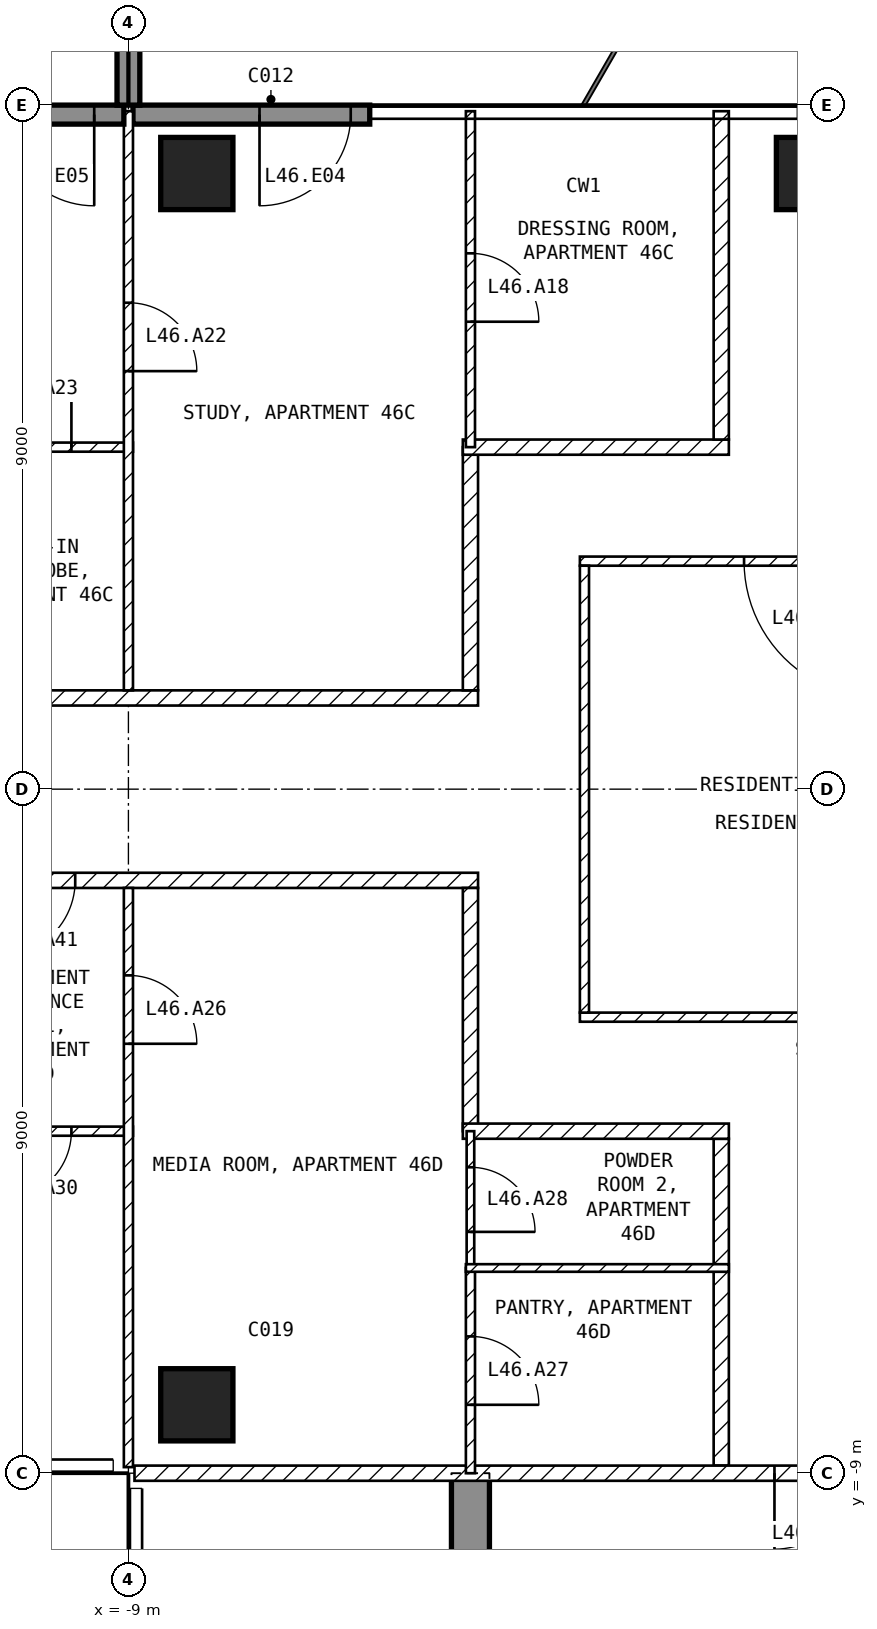
"""IFC4 building model, lengths in metres.
Left out: names, types, materials, properties, quantities, classifications, styles, units other than length and angle.
Written with IfcOpenShell. Run it as: python <this file> out.ifc"""

import sys

from ifc_helpers import new_model, si_unit, direction, frame, frame_2d, origin, origin_2d, place, context, subcontext, project, spatial, polyline, rectangle, outline, extrude, element, fill, save


model = new_model("IFC4")
c1 = context("Model", 3, precision=1e-05, world=origin(), true_north=direction((0.0, 1.0)))
c2 = subcontext(c1, "Body", "Model", "MODEL_VIEW")
j1 = project(units=[si_unit("LENGTHUNIT", "METRE"), si_unit("PLANEANGLEUNIT", "RADIAN")], contexts=[c1])
p1 = place(None, origin())
s1 = spatial("IfcSite", under=j1, at=p1, CompositionType="ELEMENT")
p2 = place(p1, origin())
s2 = spatial("IfcBuilding", under=s1, at=p2, CompositionType="ELEMENT")
p3 = place(p2, frame((0.0, 0.0, 187.6)))
s3 = spatial("IfcBuildingStorey", under=s2, at=p3, CompositionType="ELEMENT", Elevation=187.6)
for number, where, z_axis, x_axis in (
    (1, (-8.1, -8.1, -0.25), (0.0, 0.0, 1.0), (1.0, 0.0, 0.0)),
    (2, (-8.1, 8.1, -0.25), (0.0, 0.0, 1.0), (1.0, 0.0, 0.0)),
    (3, (0.0, 8.1, -0.25), (0.0, 0.0, 1.0), (1.0, 0.0, 0.0)),
):
    element("IfcColumn", number, at=place(p3, frame(where, z_axis=z_axis, x_axis=x_axis)), inside=s3, PredefinedType="COLUMN", context=c2, shape_type="SweptSolid", body=[
        extrude(rectangle(XDim=0.95, YDim=0.95, at=origin_2d()), origin(), (0.0, 0.0, 1.0), 3.5),
    ])
p4 = place(p3, frame((-4.75, -20.225, -0.25), z_axis=(1.0, 0.0, 0.0), x_axis=(0.0, 1.0, 0.0)))
e4 = element("IfcWall", 4, at=p4, inside=s3, PredefinedType="SHEAR", context=c2, shape_type="SweptSolid", body=[
    extrude(outline(polyline([(0.0, 0.0), (6.725, 0.0), (6.725, 2.65), (9.125, 2.65), (9.125, 0.0), (11.225, 0.0), (11.225, 3.5), (0.0, 3.5), (0.0, 0.0)])), origin(), (0.0, 0.0, 1.0), 0.5),
])
p5 = place(p3, frame((-5.825, 8.875, 0.0), z_axis=(0.0, 0.0, 1.0), x_axis=(-1.0, 0.0, 0.0)))
e5 = element("IfcWall", 5, at=p5, inside=s3, PredefinedType="SOLIDWALL", context=c2, shape_type="SweptSolid", body=[
    extrude(rectangle(XDim=3.115, YDim=0.25, at=frame_2d((1.558, 0.0))), origin(), (0.0, 0.0, 1.0), 3.25),
])
p6 = place(p5, frame((0.25, 0.0, 0.0)))
e6 = element("IfcOpeningElement", 6, at=p6, cuts=e5, PredefinedType="OPENING", context=c2, shape_type="SweptSolid", body=[
    extrude(rectangle(XDim=1.2, YDim=2.4, at=frame_2d((0.6, 1.2))), frame((0.0, 0.135, 0.0), z_axis=(0.0, -1.0, 0.0), x_axis=(1.0, 0.0, 0.0)), (0.0, 0.0, 1.0), 0.27),
])
p7 = place(p3, frame((-9.06, 8.875, 0.0), z_axis=(0.0, 0.0, 1.0), x_axis=(-1.0, 0.0, 0.0)))
e7 = element("IfcWall", 7, at=p7, inside=s3, PredefinedType="SOLIDWALL", context=c2, shape_type="SweptSolid", body=[
    extrude(rectangle(XDim=1.84, YDim=0.25, at=frame_2d((0.92, 0.0))), origin(), (0.0, 0.0, 1.0), 3.25),
])
p8 = place(p7, frame((0.39, 0.0, 0.0)))
e8 = element("IfcOpeningElement", 8, at=p8, cuts=e7, PredefinedType="OPENING", context=c2, shape_type="SweptSolid", body=[
    extrude(rectangle(XDim=1.2, YDim=2.4, at=frame_2d((0.6, 1.2))), frame((0.0, 0.135, 0.0), z_axis=(0.0, -1.0, 0.0), x_axis=(1.0, 0.0, 0.0)), (0.0, 0.0, 1.0), 0.27),
])
p9 = place(p3, frame((-9.0, 9.0, 0.0), z_axis=(0.0, 0.0, 1.0), x_axis=(0.0, 1.0, 0.0)))
e9 = element("IfcWall", 9, at=p9, inside=s3, PredefinedType="SOLIDWALL", context=c2, shape_type="SweptSolid", body=[
    extrude(rectangle(XDim=2.7, YDim=0.3, at=frame_2d((1.35, 0.0))), origin(), (0.0, 0.0, 1.0), 3.25),
])
p10 = place(p3, frame((-3.06, -3.0, 0.0), z_axis=(0.0, 0.0, 1.0), x_axis=(1.0, 0.0, 0.0)))
e10 = element("IfcWall", 10, at=p10, inside=s3, PredefinedType="PARTITIONING", context=c2, shape_type="SweptSolid", body=[
    extrude(rectangle(XDim=6.12, YDim=0.12, at=frame_2d((3.06, 0.0))), origin(), (0.0, 0.0, 1.0), 3.25),
])
p11 = place(p3, frame((3.06, 3.0, 0.0), z_axis=(0.0, 0.0, 1.0), x_axis=(-1.0, 0.0, 0.0)))
e11 = element("IfcWall", 11, at=p11, inside=s3, PredefinedType="PARTITIONING", context=c2, shape_type="SweptSolid", body=[
    extrude(rectangle(XDim=6.12, YDim=0.12, at=frame_2d((3.06, 0.0))), origin(), (0.0, 0.0, 1.0), 3.25),
])
p12 = place(p11, frame((2.16, 0.0, 0.0)))
e12 = element("IfcOpeningElement", 12, at=p12, cuts=e11, PredefinedType="OPENING", context=c2, shape_type="SweptSolid", body=[
    extrude(rectangle(XDim=1.8, YDim=2.1, at=frame_2d((0.9, 1.05))), frame((0.0, 0.07, 0.0), z_axis=(0.0, -1.0, 0.0), x_axis=(1.0, 0.0, 0.0)), (0.0, 0.0, 1.0), 0.14),
])
p13 = place(p3, frame((-3.0, 2.94, 0.0), z_axis=(0.0, 0.0, 1.0), x_axis=(0.0, -1.0, 0.0)))
e13 = element("IfcWall", 13, at=p13, inside=s3, PredefinedType="PARTITIONING", context=c2, shape_type="SweptSolid", body=[
    extrude(rectangle(XDim=5.88, YDim=0.12, at=frame_2d((2.94, 0.0))), origin(), (0.0, 0.0, 1.0), 3.25),
])
p14 = place(p3, frame((-21.6, 1.2, 0.0), z_axis=(0.0, 0.0, 1.0), x_axis=(1.0, 0.0, 0.0)))
e14 = element("IfcWall", 14, at=p14, inside=s3, PredefinedType="PARTITIONING", context=c2, shape_type="SweptSolid", body=[
    extrude(rectangle(XDim=17.2, YDim=0.2, at=frame_2d((8.6, 0.0))), origin(), (0.0, 0.0, 1.0), 3.25),
])
p15 = place(p14, frame((6.1, 0.0, 0.0)))
e15 = element("IfcOpeningElement", 15, at=p15, cuts=e14, PredefinedType="OPENING", context=c2, shape_type="SweptSolid", body=[
    extrude(rectangle(XDim=1.0, YDim=2.1, at=frame_2d((0.5, 1.05))), frame((0.0, 0.11, 0.0), z_axis=(0.0, -1.0, 0.0), x_axis=(1.0, 0.0, 0.0)), (0.0, 0.0, 1.0), 0.22),
])
p16 = place(p3, frame((-4.5, 1.3, 0.0), z_axis=(0.0, 0.0, 1.0), x_axis=(0.0, 1.0, 0.0)))
e16 = element("IfcWall", 16, at=p16, inside=s3, PredefinedType="PARTITIONING", context=c2, shape_type="SweptSolid", body=[
    extrude(rectangle(XDim=3.2, YDim=0.2, at=frame_2d((1.6, 0.0))), origin(), (0.0, 0.0, 1.0), 3.25),
])
p17 = place(p3, frame((-4.6, 4.5, 0.0), z_axis=(0.0, 0.0, 1.0), x_axis=(1.0, 0.0, 0.0)))
e17 = element("IfcWall", 17, at=p17, inside=s3, PredefinedType="PARTITIONING", context=c2, shape_type="SweptSolid", body=[
    extrude(rectangle(XDim=3.5, YDim=0.2, at=frame_2d((1.75, 0.0))), origin(), (0.0, 0.0, 1.0), 3.25),
])
p18 = place(p3, frame((-1.2, 4.6, 0.0), z_axis=(0.0, 0.0, 1.0), x_axis=(0.0, 1.0, 0.0)))
e18 = element("IfcWall", 18, at=p18, inside=s3, PredefinedType="PARTITIONING", context=c2, shape_type="SweptSolid", body=[
    extrude(rectangle(XDim=4.32, YDim=0.2, at=frame_2d((2.16, 0.0))), origin(), (0.0, 0.0, 1.0), 3.25),
])
p19 = place(p3, frame((-4.4, -1.2, 0.0), z_axis=(0.0, 0.0, 1.0), x_axis=(-1.0, 0.0, 0.0)))
e19 = element("IfcWall", 19, at=p19, inside=s3, PredefinedType="PARTITIONING", context=c2, shape_type="SweptSolid", body=[
    extrude(rectangle(XDim=17.2, YDim=0.2, at=frame_2d((8.6, 0.0))), origin(), (0.0, 0.0, 1.0), 3.25),
])
p20 = place(p19, frame((5.3, 0.0, 0.0)))
e20 = element("IfcOpeningElement", 20, at=p20, cuts=e19, PredefinedType="OPENING", context=c2, shape_type="SweptSolid", body=[
    extrude(rectangle(XDim=1.0, YDim=2.1, at=frame_2d((0.5, 1.05))), frame((0.0, 0.11, 0.0), z_axis=(0.0, -1.0, 0.0), x_axis=(1.0, 0.0, 0.0)), (0.0, 0.0, 1.0), 0.22),
])
p21 = place(p3, frame((-4.5, -4.5, 0.0), z_axis=(0.0, 0.0, 1.0), x_axis=(0.0, 1.0, 0.0)))
e21 = element("IfcWall", 21, at=p21, inside=s3, PredefinedType="PARTITIONING", context=c2, shape_type="SweptSolid", body=[
    extrude(rectangle(XDim=3.2, YDim=0.2, at=frame_2d((1.6, 0.0))), origin(), (0.0, 0.0, 1.0), 3.25),
])
p22 = place(p3, frame((-1.2, -8.9, 0.0), z_axis=(0.0, 0.0, 1.0), x_axis=(0.0, 1.0, 0.0)))
e22 = element("IfcWall", 22, at=p22, inside=s3, PredefinedType="PARTITIONING", context=c2, shape_type="SweptSolid", body=[
    extrude(rectangle(XDim=4.3, YDim=0.2, at=frame_2d((2.15, 0.0))), origin(), (0.0, 0.0, 1.0), 3.25),
])
p23 = place(p3, frame((-1.1, -4.5, 0.0), z_axis=(0.0, 0.0, 1.0), x_axis=(-1.0, 0.0, 0.0)))
e23 = element("IfcWall", 23, at=p23, inside=s3, PredefinedType="PARTITIONING", context=c2, shape_type="SweptSolid", body=[
    extrude(rectangle(XDim=3.5, YDim=0.2, at=frame_2d((1.75, 0.0))), origin(), (0.0, 0.0, 1.0), 3.25),
])
p24 = place(p3, frame((8.92, -9.0, 0.0), z_axis=(0.0, 0.0, 1.0), x_axis=(-1.0, 0.0, 0.0)))
e24 = element("IfcWall", 24, at=p24, inside=s3, PredefinedType="PARTITIONING", context=c2, shape_type="SweptSolid", body=[
    extrude(rectangle(XDim=17.84, YDim=0.2, at=frame_2d((8.92, 0.0))), origin(), (0.0, 0.0, 1.0), 3.25),
])
p25 = place(p24, frame((8.42, 0.0, 0.0)))
e25 = element("IfcOpeningElement", 25, at=p25, cuts=e24, PredefinedType="OPENING", context=c2, shape_type="SweptSolid", body=[
    extrude(rectangle(XDim=1.0, YDim=2.1, at=frame_2d((0.5, 1.05))), frame((0.0, 0.11, 0.0), z_axis=(0.0, -1.0, 0.0), x_axis=(1.0, 0.0, 0.0)), (0.0, 0.0, 1.0), 0.22),
])
p26 = place(p3, frame((-11.4, 4.5, 0.0), z_axis=(0.0, 0.0, 1.0), x_axis=(1.0, 0.0, 0.0)))
e26 = element("IfcWall", 26, at=p26, inside=s3, PredefinedType="PARTITIONING", context=c2, shape_type="SweptSolid", body=[
    extrude(rectangle(XDim=2.46, YDim=0.12, at=frame_2d((1.23, 0.0))), origin(), (0.0, 0.0, 1.0), 3.25),
])
p27 = place(p26, frame((0.75, 0.0, 0.0)))
e27 = element("IfcOpeningElement", 27, at=p27, cuts=e26, PredefinedType="OPENING", context=c2, shape_type="SweptSolid", body=[
    extrude(rectangle(XDim=0.9, YDim=2.1, at=frame_2d((0.45, 1.05))), frame((0.0, 0.07, 0.0), z_axis=(0.0, -1.0, 0.0), x_axis=(1.0, 0.0, 0.0)), (0.0, 0.0, 1.0), 0.14),
])
p28 = place(p3, frame((-9.0, 8.92, 0.0), z_axis=(0.0, 0.0, 1.0), x_axis=(0.0, -1.0, 0.0)))
e28 = element("IfcWall", 28, at=p28, inside=s3, PredefinedType="PARTITIONING", context=c2, shape_type="SweptSolid", body=[
    extrude(rectangle(XDim=7.62, YDim=0.12, at=frame_2d((3.81, 0.0))), origin(), (0.0, 0.0, 1.0), 3.25),
])
p29 = place(p28, frame((2.52, 0.0, 0.0)))
e29 = element("IfcOpeningElement", 29, at=p29, cuts=e28, PredefinedType="OPENING", context=c2, shape_type="SweptSolid", body=[
    extrude(rectangle(XDim=0.9, YDim=2.1, at=frame_2d((0.45, 1.05))), frame((0.0, 0.07, 0.0), z_axis=(0.0, -1.0, 0.0), x_axis=(1.0, 0.0, 0.0)), (0.0, 0.0, 1.0), 0.14),
])
p30 = place(p3, frame((-4.5, 8.92, 0.0), z_axis=(0.0, 0.0, 1.0), x_axis=(0.0, -1.0, 0.0)))
e30 = element("IfcWall", 30, at=p30, inside=s3, PredefinedType="PARTITIONING", context=c2, shape_type="SweptSolid", body=[
    extrude(rectangle(XDim=4.42, YDim=0.12, at=frame_2d((2.21, 0.0))), origin(), (0.0, 0.0, 1.0), 3.25),
])
p31 = place(p30, frame((1.87, 0.0, 0.0)))
e31 = element("IfcOpeningElement", 31, at=p31, cuts=e30, PredefinedType="OPENING", context=c2, shape_type="SweptSolid", body=[
    extrude(rectangle(XDim=0.9, YDim=2.1, at=frame_2d((0.45, 1.05))), frame((0.0, 0.07, 0.0), z_axis=(0.0, -1.0, 0.0), x_axis=(1.0, 0.0, 0.0)), (0.0, 0.0, 1.0), 0.14),
])
p32 = place(p3, frame((-8.94, -4.5, 0.0), z_axis=(0.0, 0.0, 1.0), x_axis=(-1.0, 0.0, 0.0)))
e32 = element("IfcWall", 32, at=p32, inside=s3, PredefinedType="PARTITIONING", context=c2, shape_type="SweptSolid", body=[
    extrude(rectangle(XDim=5.46, YDim=0.12, at=frame_2d((2.73, 0.0))), origin(), (0.0, 0.0, 1.0), 3.25),
])
p33 = place(p32, frame((0.81, 0.0, 0.0)))
e33 = element("IfcOpeningElement", 33, at=p33, cuts=e32, PredefinedType="OPENING", context=c2, shape_type="SweptSolid", body=[
    extrude(rectangle(XDim=0.9, YDim=2.1, at=frame_2d((0.45, 1.05))), frame((0.0, 0.07, 0.0), z_axis=(0.0, -1.0, 0.0), x_axis=(1.0, 0.0, 0.0)), (0.0, 0.0, 1.0), 0.14),
])
p34 = place(p3, frame((-9.0, -1.3, 0.0), z_axis=(0.0, 0.0, 1.0), x_axis=(0.0, -1.0, 0.0)))
e34 = element("IfcWall", 34, at=p34, inside=s3, PredefinedType="PARTITIONING", context=c2, shape_type="SweptSolid", body=[
    extrude(rectangle(XDim=7.62, YDim=0.12, at=frame_2d((3.81, 0.0))), origin(), (0.0, 0.0, 1.0), 3.25),
])
p35 = place(p34, frame((1.15, 0.0, 0.0)))
e35 = element("IfcOpeningElement", 35, at=p35, cuts=e34, PredefinedType="OPENING", context=c2, shape_type="SweptSolid", body=[
    extrude(rectangle(XDim=0.9, YDim=2.1, at=frame_2d((0.45, 1.05))), frame((0.0, 0.07, 0.0), z_axis=(0.0, -1.0, 0.0), x_axis=(1.0, 0.0, 0.0)), (0.0, 0.0, 1.0), 0.14),
])
p36 = place(p3, frame((-4.5, -4.5, 0.0), z_axis=(0.0, 0.0, 1.0), x_axis=(0.0, -1.0, 0.0)))
e36 = element("IfcWall", 36, at=p36, inside=s3, PredefinedType="PARTITIONING", context=c2, shape_type="SweptSolid", body=[
    extrude(rectangle(XDim=1.8, YDim=0.1, at=frame_2d((0.9, 0.0))), origin(), (0.0, 0.0, 1.0), 3.25),
])
p37 = place(p36, frame((0.475, 0.0, 0.0)))
e37 = element("IfcOpeningElement", 37, at=p37, cuts=e36, PredefinedType="OPENING", context=c2, shape_type="SweptSolid", body=[
    extrude(rectangle(XDim=0.85, YDim=2.1, at=frame_2d((0.425, 1.05))), frame((0.0, 0.06, 0.0), z_axis=(0.0, -1.0, 0.0), x_axis=(1.0, 0.0, 0.0)), (0.0, 0.0, 1.0), 0.12),
])
p38 = place(p3, frame((-4.5, -6.3, 0.0), z_axis=(0.0, 0.0, 1.0), x_axis=(0.0, -1.0, 0.0)))
e38 = element("IfcWall", 38, at=p38, inside=s3, PredefinedType="PARTITIONING", context=c2, shape_type="SweptSolid", body=[
    extrude(rectangle(XDim=2.7, YDim=0.12, at=frame_2d((1.35, 0.0))), origin(), (0.0, 0.0, 1.0), 3.25),
])
p39 = place(p38, frame((0.9, 0.0, 0.0)))
e39 = element("IfcOpeningElement", 39, at=p39, cuts=e38, PredefinedType="OPENING", context=c2, shape_type="SweptSolid", body=[
    extrude(rectangle(XDim=0.9, YDim=2.1, at=frame_2d((0.45, 1.05))), frame((0.0, 0.07, 0.0), z_axis=(0.0, -1.0, 0.0), x_axis=(1.0, 0.0, 0.0)), (0.0, 0.0, 1.0), 0.14),
])
p40 = place(p3, frame((-1.1, -6.3, 0.0), z_axis=(0.0, 0.0, 1.0), x_axis=(-1.0, 0.0, 0.0)))
e40 = element("IfcWall", 40, at=p40, inside=s3, PredefinedType="PARTITIONING", context=c2, shape_type="SweptSolid", body=[
    extrude(rectangle(XDim=3.46, YDim=0.1, at=frame_2d((1.73, 0.0))), origin(), (0.0, 0.0, 1.0), 3.25),
])
p41 = place(p6, origin())
e41 = element("IfcDoor", 41, at=p41, inside=s3, OperationType="SINGLE_SWING_RIGHT", PredefinedType="DOOR", context=c2, shape_type="SweptSolid", body=[
    extrude(rectangle(XDim=1.2, YDim=2.4, at=frame_2d((0.6, 1.2))), frame((0.0, 0.025, 0.0), z_axis=(0.0, -1.0, 0.0), x_axis=(1.0, 0.0, 0.0)), (0.0, 0.0, 1.0), 0.05),
])
fill(e6, e41)
p42 = place(p8, origin())
e42 = element("IfcDoor", 42, at=p42, inside=s3, OperationType="SINGLE_SWING_LEFT", PredefinedType="DOOR", context=c2, shape_type="SweptSolid", body=[
    extrude(rectangle(XDim=1.2, YDim=2.4, at=frame_2d((0.6, 1.2))), frame((0.0, 0.025, 0.0), z_axis=(0.0, -1.0, 0.0), x_axis=(1.0, 0.0, 0.0)), (0.0, 0.0, 1.0), 0.05),
])
fill(e8, e42)
p43 = place(p12, origin())
e43 = element("IfcDoor", 43, at=p43, inside=s3, OperationType="SINGLE_SWING_LEFT", PredefinedType="DOOR", context=c2, shape_type="SweptSolid", body=[
    extrude(rectangle(XDim=1.8, YDim=2.1, at=frame_2d((0.9, 1.05))), frame((0.0, 0.025, 0.0), z_axis=(0.0, -1.0, 0.0), x_axis=(1.0, 0.0, 0.0)), (0.0, 0.0, 1.0), 0.05),
])
fill(e12, e43)
p44 = place(p31, origin())
e44 = element("IfcDoor", 44, at=p44, inside=s3, OperationType="SINGLE_SWING_RIGHT", PredefinedType="DOOR", context=c2, shape_type="SweptSolid", body=[
    extrude(rectangle(XDim=0.9, YDim=2.1, at=frame_2d((0.45, 1.05))), frame((0.0, 0.025, 0.0), z_axis=(0.0, -1.0, 0.0), x_axis=(1.0, 0.0, 0.0)), (0.0, 0.0, 1.0), 0.05),
])
fill(e31, e44)
p45 = place(p29, origin())
e45 = element("IfcDoor", 45, at=p45, inside=s3, OperationType="SINGLE_SWING_RIGHT", PredefinedType="DOOR", context=c2, shape_type="SweptSolid", body=[
    extrude(rectangle(XDim=0.9, YDim=2.1, at=frame_2d((0.45, 1.05))), frame((0.0, 0.025, 0.0), z_axis=(0.0, -1.0, 0.0), x_axis=(1.0, 0.0, 0.0)), (0.0, 0.0, 1.0), 0.05),
])
fill(e29, e45)
p46 = place(p27, origin())
e46 = element("IfcDoor", 46, at=p46, inside=s3, OperationType="SINGLE_SWING_RIGHT", PredefinedType="DOOR", context=c2, shape_type="SweptSolid", body=[
    extrude(rectangle(XDim=0.9, YDim=2.1, at=frame_2d((0.45, 1.05))), frame((0.0, 0.025, 0.0), z_axis=(0.0, -1.0, 0.0), x_axis=(1.0, 0.0, 0.0)), (0.0, 0.0, 1.0), 0.05),
])
fill(e27, e46)
p47 = place(p35, origin())
e47 = element("IfcDoor", 47, at=p47, inside=s3, OperationType="SINGLE_SWING_RIGHT", PredefinedType="DOOR", context=c2, shape_type="SweptSolid", body=[
    extrude(rectangle(XDim=0.9, YDim=2.1, at=frame_2d((0.45, 1.05))), frame((0.0, 0.025, 0.0), z_axis=(0.0, -1.0, 0.0), x_axis=(1.0, 0.0, 0.0)), (0.0, 0.0, 1.0), 0.05),
])
fill(e35, e47)
p48 = place(p39, origin())
e48 = element("IfcDoor", 48, at=p48, inside=s3, OperationType="SINGLE_SWING_RIGHT", PredefinedType="DOOR", context=c2, shape_type="SweptSolid", body=[
    extrude(rectangle(XDim=0.9, YDim=2.1, at=frame_2d((0.45, 1.05))), frame((0.0, 0.025, 0.0), z_axis=(0.0, -1.0, 0.0), x_axis=(1.0, 0.0, 0.0)), (0.0, 0.0, 1.0), 0.05),
])
fill(e39, e48)
p49 = place(p37, origin())
e49 = element("IfcDoor", 49, at=p49, inside=s3, OperationType="SINGLE_SWING_RIGHT", PredefinedType="DOOR", context=c2, shape_type="SweptSolid", body=[
    extrude(rectangle(XDim=0.85, YDim=2.1, at=frame_2d((0.425, 1.05))), frame((0.0, 0.025, 0.0), z_axis=(0.0, -1.0, 0.0), x_axis=(1.0, 0.0, 0.0)), (0.0, 0.0, 1.0), 0.05),
])
fill(e37, e49)
p50 = place(p33, origin())
e50 = element("IfcDoor", 50, at=p50, inside=s3, OperationType="SINGLE_SWING_RIGHT", PredefinedType="DOOR", context=c2, shape_type="SweptSolid", body=[
    extrude(rectangle(XDim=0.9, YDim=2.1, at=frame_2d((0.45, 1.05))), frame((0.0, 0.025, 0.0), z_axis=(0.0, -1.0, 0.0), x_axis=(1.0, 0.0, 0.0)), (0.0, 0.0, 1.0), 0.05),
])
fill(e33, e50)
p51 = place(p25, origin())
e51 = element("IfcDoor", 51, at=p51, inside=s3, OperationType="SINGLE_SWING_RIGHT", PredefinedType="DOOR", context=c2, shape_type="SweptSolid", body=[
    extrude(rectangle(XDim=1.0, YDim=2.1, at=frame_2d((0.5, 1.05))), frame((0.0, 0.025, 0.0), z_axis=(0.0, -1.0, 0.0), x_axis=(1.0, 0.0, 0.0)), (0.0, 0.0, 1.0), 0.05),
])
fill(e25, e51)
p52 = place(p20, origin())
e52 = element("IfcDoor", 52, at=p52, inside=s3, OperationType="SINGLE_SWING_RIGHT", PredefinedType="DOOR", context=c2, shape_type="SweptSolid", body=[
    extrude(rectangle(XDim=1.0, YDim=2.1, at=frame_2d((0.5, 1.05))), frame((0.0, 0.025, 0.0), z_axis=(0.0, -1.0, 0.0), x_axis=(1.0, 0.0, 0.0)), (0.0, 0.0, 1.0), 0.05),
])
fill(e20, e52)
save(model, sys.argv[1])
